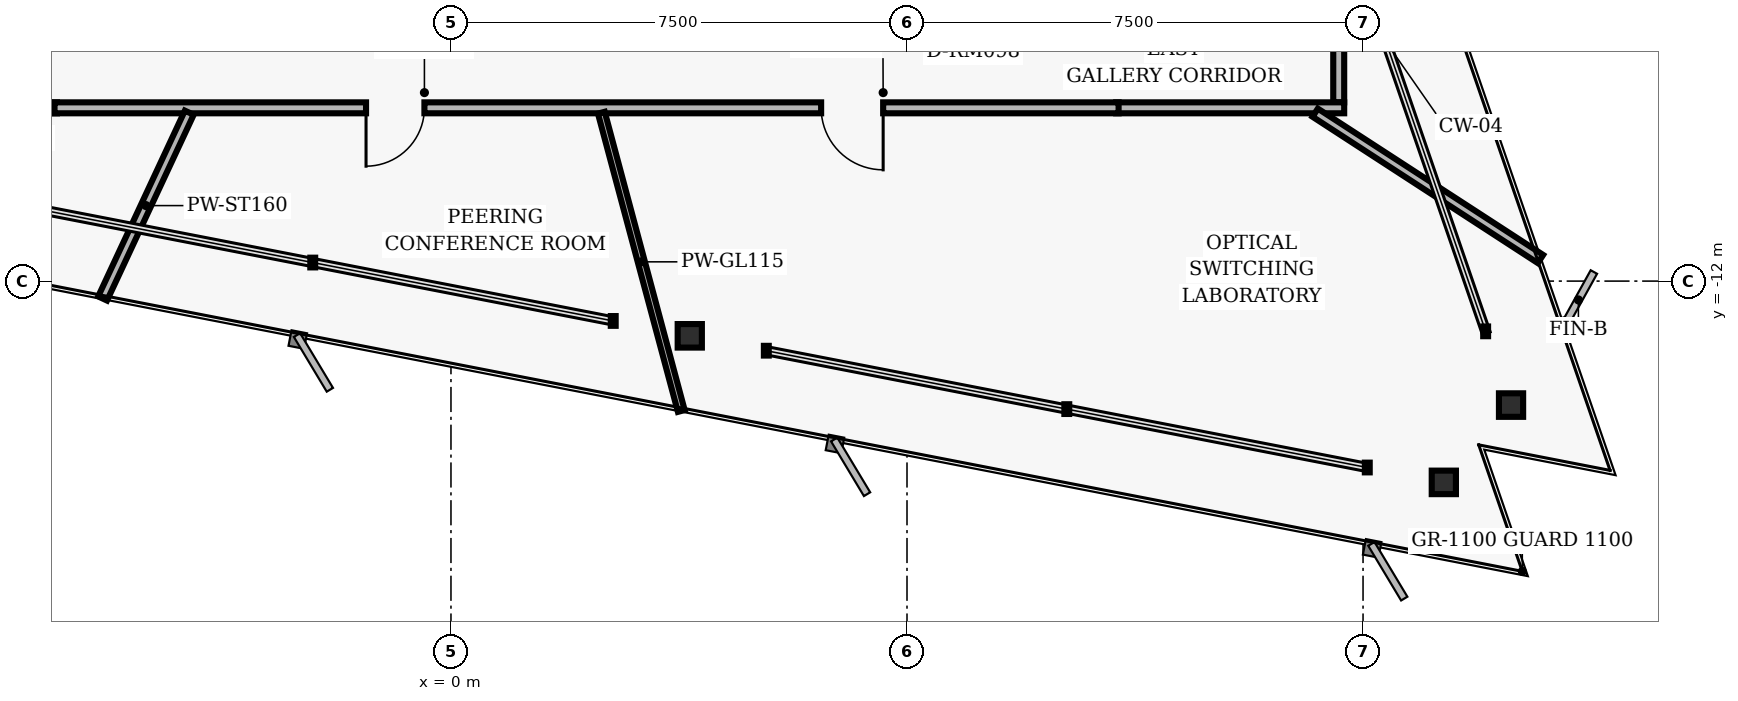
"""IFC4 building model, lengths in metres.
Left out: names, types, materials, properties, quantities, classifications, styles, units other than length and angle.
Written with IfcOpenShell. Run it as: python <this file> out.ifc"""

import sys

from ifc_helpers import new_model, si_unit, direction, frame, frame_2d, origin, origin_2d, place, context, subcontext, project, spatial, rectangle, i_section, extrude, element, fill, save


model = new_model("IFC4")
c1 = context("Model", 3, precision=1e-05, world=origin(), true_north=direction((0.0, 1.0)))
c2 = subcontext(c1, "Body", "Model", "MODEL_VIEW")
j1 = project(units=[si_unit("LENGTHUNIT", "METRE"), si_unit("PLANEANGLEUNIT", "RADIAN")], contexts=[c1])
p1 = place(None, origin())
s1 = spatial("IfcSite", under=j1, at=p1, CompositionType="ELEMENT")
p2 = place(p1, origin())
s2 = spatial("IfcBuilding", under=s1, at=p2, CompositionType="ELEMENT")
p3 = place(p2, frame((0.0, 0.0, 159.36)))
s3 = spatial("IfcBuildingStorey", under=s2, at=p3, CompositionType="ELEMENT", Elevation=159.36)
for number, where, z_axis, x_axis in (
    (1, (17.434, -14.039, 0.0), (0.0, 0.0, 1.0), (1.0, 0.0, 0.0)),
    (2, (3.927, -12.9, 0.0), (0.0, 0.0, 1.0), (1.0, 0.0, 0.0)),
    (3, (16.329, -15.311, 0.0), (0.0, 0.0, 1.0), (1.0, 0.0, 0.0)),
):
    element("IfcColumn", number, at=place(p3, frame(where, z_axis=z_axis, x_axis=x_axis)), inside=s3, PredefinedType="COLUMN", context=c2, shape_type="SweptSolid", body=[
        extrude(i_section(OverallWidth=0.398, OverallDepth=0.387, WebThickness=0.021, FlangeThickness=0.033, FilletRadius=0.018, at=origin_2d()), origin(), (0.0, 0.0, 1.0), 3.04),
    ])
p4 = place(p3, frame((-6.48, -9.15, 0.0), z_axis=(0.0, 0.0, 1.0), x_axis=(-1.0, 0.0, 0.0)))
e4 = element("IfcWall", 4, at=p4, inside=s3, PredefinedType="PARTITIONING", context=c2, shape_type="SweptSolid", body=[
    extrude(rectangle(XDim=1.86, YDim=0.18, at=frame_2d((0.93, 0.0))), origin(), (0.0, 0.0, 1.0), 2.33),
])
p5 = place(p3, frame((14.6, -7.18, 0.0), z_axis=(0.0, 0.0, 1.0), x_axis=(0.0, -1.0, 0.0)))
e5 = element("IfcWall", 5, at=p5, inside=s3, PredefinedType="PARTITIONING", context=c2, shape_type="SweptSolid", body=[
    extrude(rectangle(XDim=1.88, YDim=0.18, at=frame_2d((0.94, 0.0))), origin(), (0.0, 0.0, 1.0), 2.763),
])
p6 = place(p3, frame((14.69, -9.15, 0.0), z_axis=(0.0, 0.0, 1.0), x_axis=(-1.0, 0.0, 0.0)))
e6 = element("IfcWall", 6, at=p6, inside=s3, PredefinedType="PARTITIONING", context=c2, shape_type="SweptSolid", body=[
    extrude(rectangle(XDim=3.75, YDim=0.18, at=frame_2d((1.875, 0.0))), origin(), (0.0, 0.0, 1.0), 2.763),
])
p7 = place(p3, frame((10.98, -9.15, 0.0), z_axis=(0.0, 0.0, 1.0), x_axis=(-1.0, 0.0, 0.0)))
e7 = element("IfcWall", 7, at=p7, inside=s3, PredefinedType="PARTITIONING", context=c2, shape_type="SweptSolid", body=[
    extrude(rectangle(XDim=17.5, YDim=0.18, at=frame_2d((8.75, 0.0))), origin(), (0.0, 0.0, 1.0), 2.33),
])
p8 = place(p7, frame((11.417, 0.0, 0.0)))
e8 = element("IfcOpeningElement", 8, at=p8, cuts=e7, PredefinedType="OPENING", context=c2, shape_type="SweptSolid", body=[
    extrude(rectangle(XDim=0.96, YDim=2.02, at=frame_2d((0.48, 1.01))), frame((0.0, 0.1, 0.0), z_axis=(0.0, -1.0, 0.0), x_axis=(1.0, 0.0, 0.0)), (0.0, 0.0, 1.0), 0.2),
])
p9 = place(p7, frame((3.872, 0.0, 0.0)))
e9 = element("IfcOpeningElement", 9, at=p9, cuts=e7, PredefinedType="OPENING", context=c2, shape_type="SweptSolid", body=[
    extrude(rectangle(XDim=1.02, YDim=2.02, at=frame_2d((0.51, 1.01))), frame((0.0, 0.1, 0.0), z_axis=(0.0, -1.0, 0.0), x_axis=(1.0, 0.0, 0.0)), (0.0, 0.0, 1.0), 0.2),
])
p10 = place(p3, frame((-4.304, -9.23, 0.0), z_axis=(0.0, 0.0, 1.0), x_axis=(-0.422604032696, -0.906314422013, 0.0)))
e10 = element("IfcWall", 10, at=p10, inside=s3, PredefinedType="PARTITIONING", context=c2, shape_type="SweptSolid", body=[
    extrude(rectangle(XDim=3.372, YDim=0.16, at=frame_2d((1.686, 0.0))), origin(), (0.0, 0.0, 1.0), 2.763),
])
p11 = place(p3, frame((2.473, -9.23, 0.0), z_axis=(0.0, 0.0, 1.0), x_axis=(0.258799355676, -0.96593110184, 0.0)))
e11 = element("IfcWall", 11, at=p11, inside=s3, PredefinedType="MOVABLE", context=c2, shape_type="SweptSolid", body=[
    extrude(rectangle(XDim=5.079, YDim=0.115, at=frame_2d((2.54, 0.0))), origin(), (0.0, 0.0, 1.0), 2.763),
])
p12 = place(p3, frame((14.213, -9.23, 0.0), z_axis=(0.0, 0.0, 1.0), x_axis=(0.83867205822, -0.544636740187, 0.0)))
e12 = element("IfcWall", 12, at=p12, inside=s3, PredefinedType="PARTITIONING", context=c2, shape_type="SweptSolid", body=[
    extrude(rectangle(XDim=4.418, YDim=0.16, at=frame_2d((2.209, 0.0))), origin(), (0.0, 0.0, 1.0), 2.763),
])
p13 = place(p8, origin())
e13 = element("IfcDoor", 13, at=p13, inside=s3, OperationType="SINGLE_SWING_RIGHT", PredefinedType="DOOR", context=c2, shape_type="SweptSolid", body=[
    extrude(rectangle(XDim=0.96, YDim=2.02, at=frame_2d((0.48, 1.01))), frame((0.0, 0.025, 0.0), z_axis=(0.0, -1.0, 0.0), x_axis=(1.0, 0.0, 0.0)), (0.0, 0.0, 1.0), 0.05),
])
fill(e8, e13)
p14 = place(p9, origin())
e14 = element("IfcDoor", 14, at=p14, inside=s3, OperationType="SINGLE_SWING_LEFT", PredefinedType="DOOR", context=c2, shape_type="SweptSolid", body=[
    extrude(rectangle(XDim=1.02, YDim=2.02, at=frame_2d((0.51, 1.01))), frame((0.0, 0.025, 0.0), z_axis=(0.0, -1.0, 0.0), x_axis=(1.0, 0.0, 0.0)), (0.0, 0.0, 1.0), 0.05),
])
fill(e9, e14)
save(model, sys.argv[1])
